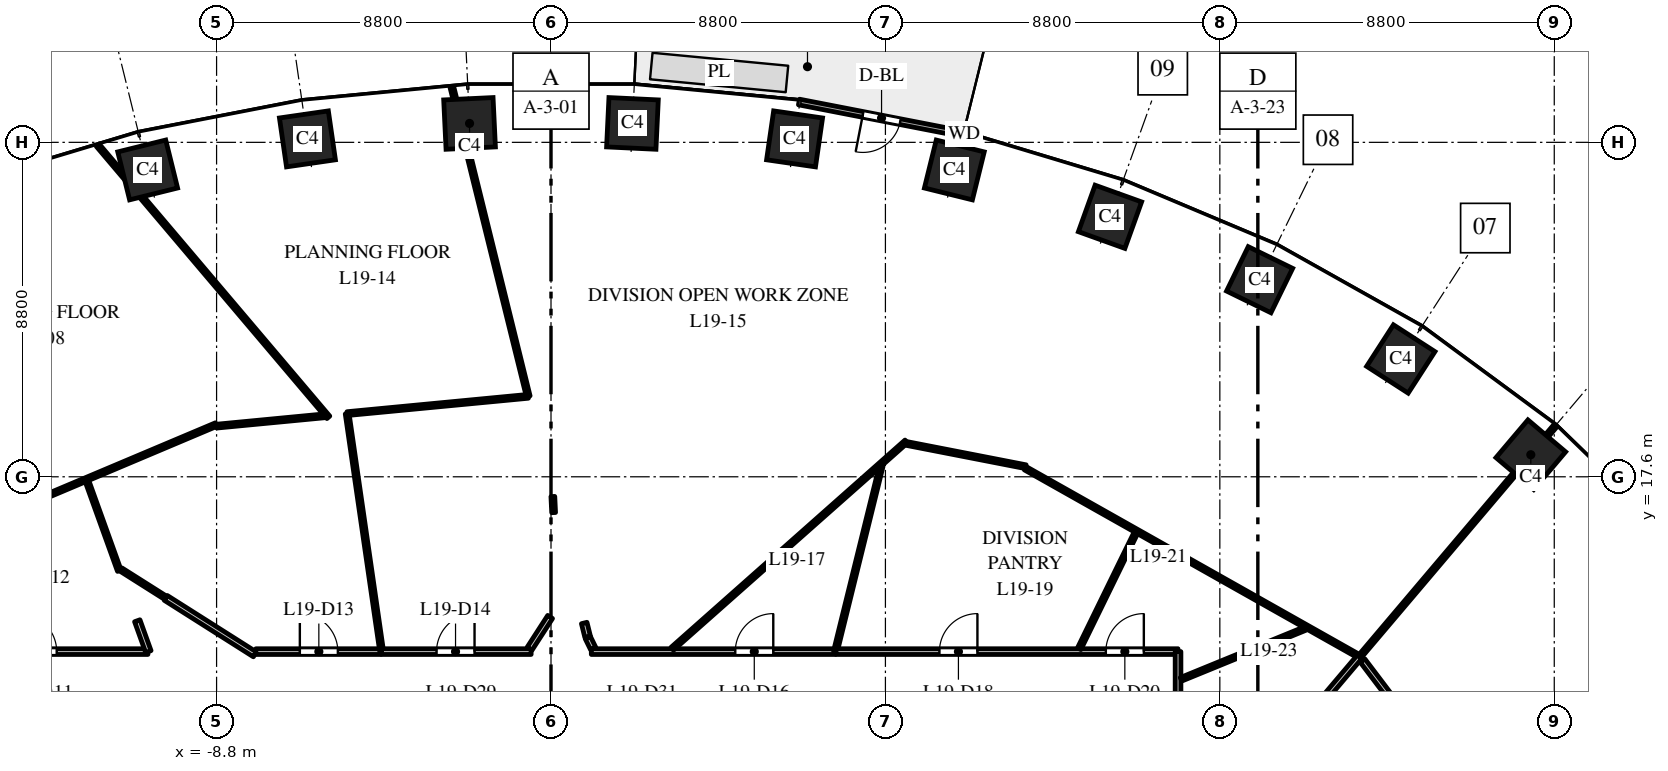
"""IFC4 building model, lengths in metres.
Left out: names, types, materials, properties, quantities, classifications, styles, units other than length and angle.
Written with IfcOpenShell. Run it as: python <this file> out.ifc"""

import sys

from ifc_helpers import new_model, si_unit, direction, frame, frame_2d, origin, origin_2d, place, context, subcontext, project, spatial, rectangle, extrude, element, fill, save


model = new_model("IFC4")
c1 = context("Model", 3, precision=1e-05, world=origin(), true_north=direction((0.0, 1.0)))
c2 = subcontext(c1, "Body", "Model", "MODEL_VIEW")
j1 = project(units=[si_unit("LENGTHUNIT", "METRE"), si_unit("PLANEANGLEUNIT", "RADIAN")], contexts=[c1])
p1 = place(None, origin())
s1 = spatial("IfcSite", under=j1, at=p1, CompositionType="ELEMENT")
p2 = place(p1, origin())
s2 = spatial("IfcBuilding", under=s1, at=p2, CompositionType="ELEMENT")
p3 = place(p2, frame((0.0, 0.0, 88.0)))
s3 = spatial("IfcBuildingStorey", under=s2, at=p3, CompositionType="ELEMENT", Elevation=88.0)
for number, where, z_axis, x_axis in (
    (1, (25.783, 18.18, 0.0), (0.0, 0.0, 1.0), (-0.763, 0.646, 0.0)),
    (2, (22.362, 20.7, 0.0), (0.0, 0.0, 1.0), (-0.84, 0.542, 0.0)),
    (3, (18.646, 22.785, 0.0), (0.0, 0.0, 1.0), (-0.898, 0.439, 0.0)),
    (4, (14.709, 24.441, 0.0), (0.0, 0.0, 1.0), (-0.941, 0.338, 0.0)),
    (5, (10.613, 25.674, 0.0), (0.0, 0.0, 1.0), (-0.971, 0.24, 0.0)),
    (6, (6.409, 26.491, 0.0), (0.0, 0.0, 1.0), (-0.99, 0.143, 0.0)),
    (7, (2.143, 26.898, 0.0), (0.0, 0.0, 1.0), (-0.999, 0.048, 0.0)),
    (8, (-2.143, 26.898, 0.0), (0.0, 0.0, 1.0), (-0.999, -0.048, 0.0)),
    (9, (-6.409, 26.491, 0.0), (0.0, 0.0, 1.0), (-0.99, -0.143, 0.0)),
    (10, (-10.613, 25.674, 0.0), (0.0, 0.0, 1.0), (-0.971, -0.24, 0.0)),
):
    element("IfcColumn", number, at=place(p3, frame(where, z_axis=z_axis, x_axis=x_axis)), inside=s3, PredefinedType="COLUMN", context=c2, shape_type="SweptSolid", body=[
        extrude(rectangle(XDim=1.3, YDim=1.3, at=origin_2d()), origin(), (0.0, 0.0, 1.0), 4.0),
    ])
p4 = place(p3, frame((10.871, 26.617, 0.0), z_axis=(0.0, 0.0, 1.0), x_axis=(-0.981631174778, 0.190788460615, 0.0)))
e11 = element("IfcWall", 11, at=p4, inside=s3, PredefinedType="STANDARD", context=c2, shape_type="SweptSolid", body=[
    extrude(rectangle(XDim=4.426, YDim=0.15, at=frame_2d((2.213, 0.0))), origin(), (0.0, 0.0, 1.0), 3.7),
])
p5 = place(p4, frame((1.713, 0.0, 0.0)))
e12 = element("IfcOpeningElement", 12, at=p5, cuts=e11, PredefinedType="OPENING", context=c2, shape_type="SweptSolid", body=[
    extrude(rectangle(XDim=1.0, YDim=2.4, at=frame_2d((0.5, 1.2))), frame((0.0, 0.085, 0.0), z_axis=(0.0, -1.0, 0.0), x_axis=(1.0, 0.0, 0.0)), (0.0, 0.0, 1.0), 0.17),
])
p6 = place(p3, frame((-18.46, 14.902, 0.0), z_axis=(0.0, 0.0, 1.0), x_axis=(0.921302833786, 0.388845841508, 0.0)))
e13 = element("IfcWall", 13, at=p6, inside=s3, PredefinedType="PARTITIONING", context=c2, shape_type="SweptSolid", body=[
    extrude(rectangle(XDim=10.472, YDim=0.1, at=frame_2d((5.236, 0.0))), origin(), (0.0, 0.0, 1.0), 2.85),
])
p7 = place(p3, frame((-16.5, 13.0, 0.0), z_axis=(0.0, 0.0, 1.0), x_axis=(1.0, 0.0, 0.0)))
e14 = element("IfcWall", 14, at=p7, inside=s3, PredefinedType="PARTITIONING", context=c2, shape_type="SweptSolid", body=[
    extrude(rectangle(XDim=5.893, YDim=0.15, at=frame_2d((2.947, 0.0))), origin(), (0.0, 0.0, 1.0), 2.85),
])
p8 = place(p7, frame((2.493, 0.0, 0.0)))
e15 = element("IfcOpeningElement", 15, at=p8, cuts=e14, PredefinedType="OPENING", context=c2, shape_type="SweptSolid", body=[
    extrude(rectangle(XDim=1.0, YDim=2.1, at=frame_2d((0.5, 1.05))), frame((0.0, 0.085, 0.0), z_axis=(0.0, -1.0, 0.0), x_axis=(1.0, 0.0, 0.0)), (0.0, 0.0, 1.0), 0.17),
])
p9 = place(p3, frame((-12.209, 17.486, 0.0), z_axis=(0.0, 0.0, 1.0), x_axis=(0.338698771758, -0.940894862357, 0.0)))
e16 = element("IfcWall", 16, at=p9, inside=s3, PredefinedType="PARTITIONING", context=c2, shape_type="SweptSolid", body=[
    extrude(rectangle(XDim=2.506, YDim=0.1, at=frame_2d((1.253, 0.0))), origin(), (0.0, 0.0, 1.0), 3.7),
])
p10 = place(p3, frame((-11.925, 26.323, 0.0), z_axis=(0.0, 0.0, 1.0), x_axis=(0.646476265577, -0.762934098101, 0.0)))
e17 = element("IfcWall", 17, at=p10, inside=s3, PredefinedType="PARTITIONING", context=c2, shape_type="SweptSolid", body=[
    extrude(rectangle(XDim=9.384, YDim=0.1, at=frame_2d((4.692, 0.0))), origin(), (0.0, 0.0, 1.0), 2.85),
])
p11 = place(p3, frame((-11.319, 15.161, 0.0), z_axis=(0.0, 0.0, 1.0), x_axis=(0.845102975348, -0.534603555037, 0.0)))
e18 = element("IfcWall", 18, at=p11, inside=s3, PredefinedType="PARTITIONING", context=c2, shape_type="SweptSolid", body=[
    extrude(rectangle(XDim=1.399, YDim=0.1, at=frame_2d((0.699, 0.0))), origin(), (0.0, 0.0, 1.0), 3.7),
])
p12 = place(p3, frame((-10.887, 13.812, 0.0), z_axis=(0.0, 0.0, 1.0), x_axis=(0.338378813476, -0.941009977944, 0.0)))
e19 = element("IfcWall", 19, at=p12, inside=s3, PredefinedType="PARTITIONING", context=c2, shape_type="SweptSolid", body=[
    extrude(rectangle(XDim=0.863, YDim=0.15, at=frame_2d((0.432, 0.0))), origin(), (0.0, 0.0, 1.0), 2.85),
])
p13 = place(p3, frame((-10.137, 14.413, 0.0), z_axis=(0.0, 0.0, 1.0), x_axis=(0.844666662568, -0.535292657475, 0.0)))
e20 = element("IfcWall", 20, at=p13, inside=s3, PredefinedType="PARTITIONING", context=c2, shape_type="SweptSolid", body=[
    extrude(rectangle(XDim=2.776, YDim=0.15, at=frame_2d((1.388, 0.0))), origin(), (0.0, 0.0, 1.0), 3.7),
])
p14 = place(p3, frame((-8.802, 18.932, 0.0), z_axis=(0.0, 0.0, 1.0), x_axis=(0.995447320833, 0.095313332995, 0.0)))
e21 = element("IfcWall", 21, at=p14, inside=s3, PredefinedType="PARTITIONING", context=c2, shape_type="SweptSolid", body=[
    extrude(rectangle(XDim=2.856, YDim=0.1, at=frame_2d((1.428, 0.0))), origin(), (0.0, 0.0, 1.0), 2.85),
])
p15 = place(p3, frame((-7.767, 13.0, 0.0), z_axis=(0.0, 0.0, 1.0), x_axis=(1.0, 0.0, 0.0)))
e22 = element("IfcWall", 22, at=p15, inside=s3, PredefinedType="PARTITIONING", context=c2, shape_type="SweptSolid", body=[
    extrude(rectangle(XDim=3.288, YDim=0.15, at=frame_2d((1.644, 0.0))), origin(), (0.0, 0.0, 1.0), 2.85),
])
p16 = place(p15, frame((1.158, 0.0, 0.0)))
e23 = element("IfcOpeningElement", 23, at=p16, cuts=e22, PredefinedType="OPENING", context=c2, shape_type="SweptSolid", body=[
    extrude(rectangle(XDim=1.0, YDim=2.1, at=frame_2d((0.5, 1.05))), frame((0.0, 0.085, 0.0), z_axis=(0.0, -1.0, 0.0), x_axis=(1.0, 0.0, 0.0)), (0.0, 0.0, 1.0), 0.17),
])
p17 = place(p3, frame((-5.364, 19.261, 0.0), z_axis=(0.0, 0.0, 1.0), x_axis=(0.143605013025, -0.989635084379, 0.0)))
e24 = element("IfcWall", 24, at=p17, inside=s3, PredefinedType="PARTITIONING", context=c2, shape_type="SweptSolid", body=[
    extrude(rectangle(XDim=6.323, YDim=0.1, at=frame_2d((3.161, 0.0))), origin(), (0.0, 0.0, 1.0), 3.7),
])
p18 = place(p3, frame((-5.364, 19.262, 0.0), z_axis=(0.0, 0.0, 1.0), x_axis=(0.995470221286, 0.095073858302, 0.0)))
e25 = element("IfcWall", 25, at=p18, inside=s3, PredefinedType="PARTITIONING", context=c2, shape_type="SweptSolid", body=[
    extrude(rectangle(XDim=4.787, YDim=0.1, at=frame_2d((2.393, 0.0))), origin(), (0.0, 0.0, 1.0), 2.85),
])
p19 = place(p3, frame((-4.459, 13.0, 0.0), z_axis=(0.0, 0.0, 1.0), x_axis=(1.0, 0.0, 0.0)))
e26 = element("IfcWall", 26, at=p19, inside=s3, PredefinedType="PARTITIONING", context=c2, shape_type="SweptSolid", body=[
    extrude(rectangle(XDim=3.936, YDim=0.15, at=frame_2d((1.968, 0.0))), origin(), (0.0, 0.0, 1.0), 2.85),
])
p20 = place(p19, frame((1.447, 0.0, 0.0)))
e27 = element("IfcOpeningElement", 27, at=p20, cuts=e26, PredefinedType="OPENING", context=c2, shape_type="SweptSolid", body=[
    extrude(rectangle(XDim=1.0, YDim=2.1, at=frame_2d((0.5, 1.05))), frame((0.0, 0.085, 0.0), z_axis=(0.0, -1.0, 0.0), x_axis=(1.0, 0.0, 0.0)), (0.0, 0.0, 1.0), 0.17),
])
p21 = place(p3, frame((-2.609, 27.858, 0.0), z_axis=(0.0, 0.0, 1.0), x_axis=(0.239677840558, -0.970852477334, 0.0)))
e28 = element("IfcWall", 28, at=p21, inside=s3, PredefinedType="PARTITIONING", context=c2, shape_type="SweptSolid", body=[
    extrude(rectangle(XDim=8.385, YDim=0.1, at=frame_2d((4.193, 0.0))), origin(), (0.0, 0.0, 1.0), 2.85),
])
p22 = place(p3, frame((-0.564, 13.075, 0.0), z_axis=(0.0, 0.0, 1.0), x_axis=(0.542773867651, 0.839878877336, 0.0)))
e29 = element("IfcWall", 29, at=p22, inside=s3, PredefinedType="PARTITIONING", context=c2, shape_type="SweptSolid", body=[
    extrude(rectangle(XDim=0.997, YDim=0.15, at=frame_2d((0.499, 0.0))), origin(), (0.0, 0.0, 1.0), 3.7),
])
p23 = place(p3, frame((0.049, 17.081, 0.0), z_axis=(0.0, 0.0, 1.0), x_axis=(0.047263912187, -0.998882436829, 0.0)))
e30 = element("IfcWall", 30, at=p23, inside=s3, PredefinedType="PARTITIONING", context=c2, shape_type="SweptSolid", body=[
    extrude(rectangle(XDim=0.424, YDim=0.1, at=frame_2d((0.212, 0.0))), origin(), (0.0, 0.0, 1.0), 3.7),
])
p24 = place(p3, frame((0.874, 13.753, 0.0), z_axis=(0.0, 0.0, 1.0), x_axis=(0.240863917947, -0.97055889725, 0.0)))
e31 = element("IfcWall", 31, at=p24, inside=s3, PredefinedType="PARTITIONING", context=c2, shape_type="SweptSolid", body=[
    extrude(rectangle(XDim=0.378, YDim=0.15, at=frame_2d((0.189, 0.0))), origin(), (0.0, 0.0, 1.0), 3.7),
])
p25 = place(p3, frame((0.969, 13.369, 0.0), z_axis=(0.0, 0.0, 1.0), x_axis=(0.440240923942, -0.897879685084, 0.0)))
e32 = element("IfcWall", 32, at=p25, inside=s3, PredefinedType="PARTITIONING", context=c2, shape_type="SweptSolid", body=[
    extrude(rectangle(XDim=0.323, YDim=0.15, at=frame_2d((0.161, 0.0))), origin(), (0.0, 0.0, 1.0), 3.7),
])
p26 = place(p3, frame((1.061, 13.0, 0.0), z_axis=(0.0, 0.0, 1.0), x_axis=(1.0, 0.0, 0.0)))
e33 = element("IfcWall", 33, at=p26, inside=s3, PredefinedType="PARTITIONING", context=c2, shape_type="SweptSolid", body=[
    extrude(rectangle(XDim=6.422, YDim=0.15, at=frame_2d((3.211, 0.0))), origin(), (0.0, 0.0, 1.0), 2.85),
])
p27 = place(p26, frame((3.788, 0.0, 0.0)))
e34 = element("IfcOpeningElement", 34, at=p27, cuts=e33, PredefinedType="OPENING", context=c2, shape_type="SweptSolid", body=[
    extrude(rectangle(XDim=1.0, YDim=2.1, at=frame_2d((0.5, 1.05))), frame((0.0, 0.085, 0.0), z_axis=(0.0, -1.0, 0.0), x_axis=(1.0, 0.0, 0.0)), (0.0, 0.0, 1.0), 0.17),
])
p28 = place(p3, frame((3.19, 13.074, 0.0), z_axis=(0.0, 0.0, 1.0), x_axis=(0.74859996253, 0.663021942397, 0.0)))
e35 = element("IfcWall", 35, at=p28, inside=s3, PredefinedType="PARTITIONING", context=c2, shape_type="SweptSolid", body=[
    extrude(rectangle(XDim=8.228, YDim=0.1, at=frame_2d((4.114, 0.0))), origin(), (0.0, 0.0, 1.0), 2.85),
])
p29 = place(p3, frame((7.483, 13.0, 0.0), z_axis=(0.0, 0.0, 1.0), x_axis=(0.239743843509, 0.970836180568, 0.0)))
e36 = element("IfcWall", 36, at=p29, inside=s3, PredefinedType="PARTITIONING", context=c2, shape_type="SweptSolid", body=[
    extrude(rectangle(XDim=5.022, YDim=0.1, at=frame_2d((2.511, 0.0))), origin(), (0.0, 0.0, 1.0), 3.7),
])
p30 = place(p3, frame((7.499, 13.0, 0.0), z_axis=(0.0, 0.0, 1.0), x_axis=(1.0, 0.0, 0.0)))
e37 = element("IfcWall", 37, at=p30, inside=s3, PredefinedType="PARTITIONING", context=c2, shape_type="SweptSolid", body=[
    extrude(rectangle(XDim=9.001, YDim=0.15, at=frame_2d((4.5, 0.0))), origin(), (0.0, 0.0, 1.0), 2.85),
])
p31 = place(p30, frame((2.722, 0.0, 0.0)))
e38 = element("IfcOpeningElement", 38, at=p31, cuts=e37, PredefinedType="OPENING", context=c2, shape_type="SweptSolid", body=[
    extrude(rectangle(XDim=1.0, YDim=2.1, at=frame_2d((0.5, 1.05))), frame((0.0, 0.085, 0.0), z_axis=(0.0, -1.0, 0.0), x_axis=(1.0, 0.0, 0.0)), (0.0, 0.0, 1.0), 0.17),
])
p32 = place(p30, frame((7.101, 0.0, 0.0)))
e39 = element("IfcOpeningElement", 39, at=p32, cuts=e37, PredefinedType="OPENING", context=c2, shape_type="SweptSolid", body=[
    extrude(rectangle(XDim=1.0, YDim=2.1, at=frame_2d((0.5, 1.05))), frame((0.0, 0.085, 0.0), z_axis=(0.0, -1.0, 0.0), x_axis=(1.0, 0.0, 0.0)), (0.0, 0.0, 1.0), 0.17),
])
p33 = place(p3, frame((9.364, 18.475, 0.0), z_axis=(0.0, 0.0, 1.0), x_axis=(0.98152602631, -0.191328669247, 0.0)))
e40 = element("IfcWall", 40, at=p33, inside=s3, PredefinedType="PARTITIONING", context=c2, shape_type="SweptSolid", body=[
    extrude(rectangle(XDim=3.189, YDim=0.1, at=frame_2d((1.594, 0.0))), origin(), (0.0, 0.0, 1.0), 2.85),
])
p34 = place(p3, frame((12.48, 17.825, 0.0), z_axis=(0.0, 0.0, 1.0), x_axis=(0.871131718637, -0.491049415827, 0.0)))
e41 = element("IfcWall", 41, at=p34, inside=s3, PredefinedType="PARTITIONING", context=c2, shape_type="SweptSolid", body=[
    extrude(rectangle(XDim=10.101, YDim=0.1, at=frame_2d((5.05, 0.0))), origin(), (0.0, 0.0, 1.0), 3.7),
])
p35 = place(p3, frame((13.899, 13.075, 0.0), z_axis=(0.0, 0.0, 1.0), x_axis=(0.439170148288, 0.898403907412, 0.0)))
e42 = element("IfcWall", 42, at=p35, inside=s3, PredefinedType="PARTITIONING", context=c2, shape_type="SweptSolid", body=[
    extrude(rectangle(XDim=3.395, YDim=0.1, at=frame_2d((1.698, 0.0))), origin(), (0.0, 0.0, 1.0), 3.7),
])
p36 = place(p3, frame((16.5, 10.7, 0.0), z_axis=(0.0, 0.0, 1.0), x_axis=(0.0, 1.0, 0.0)))
e43 = element("IfcWall", 43, at=p36, inside=s3, PredefinedType="PARTITIONING", context=c2, shape_type="SweptSolid", body=[
    extrude(rectangle(XDim=2.3, YDim=0.15, at=frame_2d((1.15, 0.0))), origin(), (0.0, 0.0, 1.0), 3.7),
])
p37 = place(p3, frame((16.579, 12.271, 0.0), z_axis=(0.0, 0.0, 1.0), x_axis=(0.925511782592, 0.378718814272, 0.0)))
e44 = element("IfcWall", 44, at=p37, inside=s3, PredefinedType="PARTITIONING", context=c2, shape_type="SweptSolid", body=[
    extrude(rectangle(XDim=3.539, YDim=0.1, at=frame_2d((1.769, 0.0))), origin(), (0.0, 0.0, 1.0), 3.7),
])
p38 = place(p3, frame((19.511, 10.778, 0.0), z_axis=(0.0, 0.0, 1.0), x_axis=(0.64641426768, 0.762986628021, 0.0)))
e45 = element("IfcWall", 45, at=p38, inside=s3, PredefinedType="PARTITIONING", context=c2, shape_type="SweptSolid", body=[
    extrude(rectangle(XDim=2.735, YDim=0.15, at=frame_2d((1.368, 0.0))), origin(), (0.0, 0.0, 1.0), 3.7),
])
p39 = place(p3, frame((21.355, 12.765, 0.0), z_axis=(0.0, 0.0, 1.0), x_axis=(0.603391001626, -0.797445483502, 0.0)))
e46 = element("IfcWall", 46, at=p39, inside=s3, PredefinedType="PARTITIONING", context=c2, shape_type="SweptSolid", body=[
    extrude(rectangle(XDim=2.68, YDim=0.15, at=frame_2d((1.34, 0.0))), origin(), (0.0, 0.0, 1.0), 2.75),
])
p40 = place(p3, frame((21.279, 12.865, 0.0), z_axis=(0.0, 0.0, 1.0), x_axis=(0.646395355102, 0.763002650652, 0.0)))
e47 = element("IfcWall", 47, at=p40, inside=s3, PredefinedType="PARTITIONING", context=c2, shape_type="SweptSolid", body=[
    extrude(rectangle(XDim=7.969, YDim=0.1, at=frame_2d((3.984, 0.0))), origin(), (0.0, 0.0, 1.0), 2.9),
])
p41 = place(p5, origin())
e48 = element("IfcDoor", 48, at=p41, inside=s3, OperationType="SINGLE_SWING_RIGHT", PredefinedType="DOOR", context=c2, shape_type="SweptSolid", body=[
    extrude(rectangle(XDim=1.0, YDim=2.4, at=frame_2d((0.5, 1.2))), frame((0.0, 0.025, 0.0), z_axis=(0.0, -1.0, 0.0), x_axis=(1.0, 0.0, 0.0)), (0.0, 0.0, 1.0), 0.05),
])
fill(e12, e48)
p42 = place(p8, origin())
e49 = element("IfcDoor", 49, at=p42, inside=s3, OperationType="SINGLE_SWING_LEFT", PredefinedType="DOOR", context=c2, shape_type="SweptSolid", body=[
    extrude(rectangle(XDim=1.0, YDim=2.1, at=frame_2d((0.5, 1.05))), frame((0.0, 0.025, 0.0), z_axis=(0.0, -1.0, 0.0), x_axis=(1.0, 0.0, 0.0)), (0.0, 0.0, 1.0), 0.05),
])
fill(e15, e49)
p43 = place(p16, origin())
e50 = element("IfcDoor", 50, at=p43, inside=s3, OperationType="SINGLE_SWING_LEFT", PredefinedType="DOOR", context=c2, shape_type="SweptSolid", body=[
    extrude(rectangle(XDim=1.0, YDim=2.1, at=frame_2d((0.5, 1.05))), frame((0.0, 0.025, 0.0), z_axis=(0.0, -1.0, 0.0), x_axis=(1.0, 0.0, 0.0)), (0.0, 0.0, 1.0), 0.05),
])
fill(e23, e50)
p44 = place(p20, origin())
e51 = element("IfcDoor", 51, at=p44, inside=s3, OperationType="SINGLE_SWING_RIGHT", PredefinedType="DOOR", context=c2, shape_type="SweptSolid", body=[
    extrude(rectangle(XDim=1.0, YDim=2.1, at=frame_2d((0.5, 1.05))), frame((0.0, 0.025, 0.0), z_axis=(0.0, -1.0, 0.0), x_axis=(1.0, 0.0, 0.0)), (0.0, 0.0, 1.0), 0.05),
])
fill(e27, e51)
p45 = place(p27, origin())
e52 = element("IfcDoor", 52, at=p45, inside=s3, OperationType="SINGLE_SWING_RIGHT", PredefinedType="DOOR", context=c2, shape_type="SweptSolid", body=[
    extrude(rectangle(XDim=1.0, YDim=2.1, at=frame_2d((0.5, 1.05))), frame((0.0, 0.025, 0.0), z_axis=(0.0, -1.0, 0.0), x_axis=(1.0, 0.0, 0.0)), (0.0, 0.0, 1.0), 0.05),
])
fill(e34, e52)
p46 = place(p31, origin())
e53 = element("IfcDoor", 53, at=p46, inside=s3, OperationType="SINGLE_SWING_RIGHT", PredefinedType="DOOR", context=c2, shape_type="SweptSolid", body=[
    extrude(rectangle(XDim=1.0, YDim=2.1, at=frame_2d((0.5, 1.05))), frame((0.0, 0.025, 0.0), z_axis=(0.0, -1.0, 0.0), x_axis=(1.0, 0.0, 0.0)), (0.0, 0.0, 1.0), 0.05),
])
fill(e38, e53)
p47 = place(p32, origin())
e54 = element("IfcDoor", 54, at=p47, inside=s3, OperationType="SINGLE_SWING_RIGHT", PredefinedType="DOOR", context=c2, shape_type="SweptSolid", body=[
    extrude(rectangle(XDim=1.0, YDim=2.1, at=frame_2d((0.5, 1.05))), frame((0.0, 0.025, 0.0), z_axis=(0.0, -1.0, 0.0), x_axis=(1.0, 0.0, 0.0)), (0.0, 0.0, 1.0), 0.05),
])
fill(e39, e54)
save(model, sys.argv[1])
